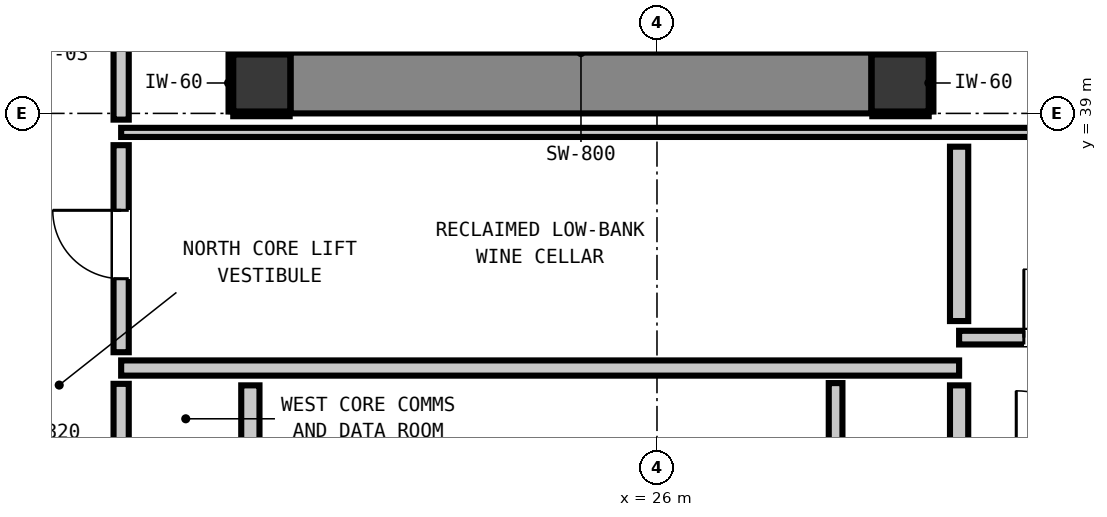
"""IFC4 building model, lengths in metres.
Left out: names, types, materials, properties, quantities, classifications, styles, units other than length and angle.
Written with IfcOpenShell. Run it as: python <this file> out.ifc"""

import sys

from ifc_helpers import new_model, si_unit, direction, frame, frame_2d, origin, origin_2d, place, context, subcontext, project, spatial, rectangle, extrude, element, fill, save


model = new_model("IFC4")
c1 = context("Model", 3, precision=1e-05, world=origin(), true_north=direction((0.0, 1.0)))
c2 = subcontext(c1, "Body", "Model", "MODEL_VIEW")
j1 = project(units=[si_unit("LENGTHUNIT", "METRE"), si_unit("PLANEANGLEUNIT", "RADIAN")], contexts=[c1])
p1 = place(None, origin())
s1 = spatial("IfcSite", under=j1, at=p1, CompositionType="ELEMENT")
p2 = place(p1, origin())
s2 = spatial("IfcBuilding", under=s1, at=p2, CompositionType="ELEMENT")
p3 = place(p2, frame((0.0, 0.0, 247.88)))
s3 = spatial("IfcBuildingStorey", under=s2, at=p3, CompositionType="ELEMENT", Elevation=247.88)
for number, where, z_axis, x_axis in (
    (1, (20.8, 39.4, 0.0), (0.0, 0.0, 1.0), (1.0, 0.0, 0.0)),
    (2, (29.2, 39.4, 0.0), (0.0, 0.0, 1.0), (1.0, 0.0, 0.0)),
):
    element("IfcColumn", number, at=place(p3, frame(where, z_axis=z_axis, x_axis=x_axis)), inside=s3, PredefinedType="COLUMN", context=c2, shape_type="SweptSolid", body=[
        extrude(rectangle(XDim=0.75, YDim=0.75, at=origin_2d()), origin(), (0.0, 0.0, 1.0), 3.32),
    ])
p4 = place(p3, frame((21.18, 39.4, 0.0), z_axis=(0.0, 0.0, 1.0), x_axis=(1.0, 0.0, 0.0)))
e3 = element("IfcWall", 3, at=p4, inside=s3, PredefinedType="SHEAR", context=c2, shape_type="SweptSolid", body=[
    extrude(rectangle(XDim=7.64, YDim=0.8, at=frame_2d((3.82, 0.0))), origin(), (0.0, 0.0, 1.0), 3.32),
])
p5 = place(p3, frame((18.95, 35.65, 0.0), z_axis=(0.0, 0.0, 1.0), x_axis=(1.0, 0.0, 0.0)))
e4 = element("IfcWall", 4, at=p5, inside=s3, PredefinedType="PARTITIONING", context=c2, shape_type="SweptSolid", body=[
    extrude(rectangle(XDim=11.025, YDim=0.2, at=frame_2d((5.513, 0.0))), origin(), (0.0, 0.0, 1.0), 2.9),
])
p6 = place(p3, frame((29.975, 36.05, 0.0), z_axis=(0.0, 0.0, 1.0), x_axis=(1.0, 0.0, 0.0)))
e5 = element("IfcWall", 5, at=p6, inside=s3, PredefinedType="PARTITIONING", context=c2, shape_type="SweptSolid", body=[
    extrude(rectangle(XDim=2.505, YDim=0.18, at=frame_2d((1.252, 0.0))), origin(), (0.0, 0.0, 1.0), 2.9),
])
p7 = place(p6, frame((0.852, 0.0, 0.0)))
e6 = element("IfcOpeningElement", 6, at=p7, cuts=e5, PredefinedType="OPENING", context=c2, shape_type="SweptSolid", body=[
    extrude(rectangle(XDim=0.9, YDim=2.1, at=frame_2d((0.45, 1.05))), frame((0.0, 0.1, 0.0), z_axis=(0.0, -1.0, 0.0), x_axis=(1.0, 0.0, 0.0)), (0.0, 0.0, 1.0), 0.2),
])
p8 = place(p3, frame((18.95, 38.75, 0.0), z_axis=(0.0, 0.0, 1.0), x_axis=(1.0, 0.0, 0.0)))
e7 = element("IfcWall", 7, at=p8, inside=s3, PredefinedType="PARTITIONING", context=c2, shape_type="SweptSolid", body=[
    extrude(rectangle(XDim=13.56, YDim=0.12, at=frame_2d((6.78, 0.0))), origin(), (0.0, 0.0, 1.0), 0.905),
])
p9 = place(p3, frame((20.65, 33.148, 0.0), z_axis=(0.0, 0.0, 1.0), x_axis=(0.0, 1.0, 0.0)))
e8 = element("IfcWall", 8, at=p9, inside=s3, PredefinedType="PARTITIONING", context=c2, shape_type="SweptSolid", body=[
    extrude(rectangle(XDim=2.274, YDim=0.24, at=frame_2d((1.137, 0.0))), origin(), (0.0, 0.0, 1.0), 0.905),
])
p10 = place(p3, frame((29.975, 34.498, 0.0), z_axis=(0.0, 0.0, 1.0), x_axis=(0.0, 1.0, 0.0)))
e9 = element("IfcWall", 9, at=p10, inside=s3, PredefinedType="PARTITIONING", context=c2, shape_type="SweptSolid", body=[
    extrude(rectangle(XDim=0.924, YDim=0.24, at=frame_2d((0.462, 0.0))), origin(), (0.0, 0.0, 1.0), 2.9),
])
p11 = place(p3, frame((29.975, 36.268, 0.0), z_axis=(0.0, 0.0, 1.0), x_axis=(0.0, 1.0, 0.0)))
e10 = element("IfcWall", 10, at=p11, inside=s3, PredefinedType="PARTITIONING", context=c2, shape_type="SweptSolid", body=[
    extrude(rectangle(XDim=2.294, YDim=0.24, at=frame_2d((1.147, 0.0))), origin(), (0.0, 0.0, 1.0), 2.9),
])
p12 = place(p3, frame((18.95, 33.128, 0.0), z_axis=(0.0, 0.0, 1.0), x_axis=(0.0, 1.0, 0.0)))
e11 = element("IfcWall", 11, at=p12, inside=s3, PredefinedType="PARTITIONING", context=c2, shape_type="SweptSolid", body=[
    extrude(rectangle(XDim=2.314, YDim=0.2, at=frame_2d((1.157, 0.0))), origin(), (0.0, 0.0, 1.0), 2.9),
])
p13 = place(p3, frame((18.95, 35.858, 0.0), z_axis=(0.0, 0.0, 1.0), x_axis=(0.0, 1.0, 0.0)))
e12 = element("IfcWall", 12, at=p13, inside=s3, PredefinedType="PARTITIONING", context=c2, shape_type="SweptSolid", body=[
    extrude(rectangle(XDim=2.724, YDim=0.2, at=frame_2d((1.362, 0.0))), origin(), (0.0, 0.0, 1.0), 2.9),
])
p14 = place(p13, frame((0.967, 0.0, 0.0)))
e13 = element("IfcOpeningElement", 13, at=p14, cuts=e12, PredefinedType="OPENING", context=c2, shape_type="SweptSolid", body=[
    extrude(rectangle(XDim=0.9, YDim=2.1, at=frame_2d((0.45, 1.05))), frame((0.0, 0.11, 0.0), z_axis=(0.0, -1.0, 0.0), x_axis=(1.0, 0.0, 0.0)), (0.0, 0.0, 1.0), 0.22),
])
p15 = place(p3, frame((18.95, 38.918, 0.0), z_axis=(0.0, 0.0, 1.0), x_axis=(0.0, 1.0, 0.0)))
e14 = element("IfcWall", 14, at=p15, inside=s3, PredefinedType="PARTITIONING", context=c2, shape_type="SweptSolid", body=[
    extrude(rectangle(XDim=1.134, YDim=0.2, at=frame_2d((0.567, 0.0))), origin(), (0.0, 0.0, 1.0), 2.9),
])
p16 = place(p3, frame((28.35, 31.838, 0.0), z_axis=(0.0, 0.0, 1.0), x_axis=(0.0, 1.0, 0.0)))
e15 = element("IfcWall", 15, at=p16, inside=s3, PredefinedType="PARTITIONING", context=c2, shape_type="SweptSolid", body=[
    extrude(rectangle(XDim=3.614, YDim=0.18, at=frame_2d((1.807, 0.0))), origin(), (0.0, 0.0, 1.0), 2.9),
])
for number, where, z_axis, x_axis in (
    (16, (20.425, 38.993, 0.0), (0.0, 0.0, 1.0), (1.0, 0.0, 0.0)),
    (17, (20.425, 39.807, 0.0), (0.0, 0.0, 1.0), (1.0, 0.0, 0.0)),
):
    element("IfcWall", number, at=place(p3, frame(where, z_axis=z_axis, x_axis=x_axis)), inside=s3, PredefinedType="PARTITIONING", context=c2, shape_type="SweptSolid", body=[
        extrude(rectangle(XDim=0.742, YDim=0.06, at=frame_2d((0.371, 0.0))), origin(), (0.0, 0.0, 1.0), 0.905),
    ])
p17 = place(p3, frame((20.393, 39.025, 0.0), z_axis=(0.0, 0.0, 1.0), x_axis=(0.0, 1.0, 0.0)))
e18 = element("IfcWall", 18, at=p17, inside=s3, PredefinedType="PARTITIONING", context=c2, shape_type="SweptSolid", body=[
    extrude(rectangle(XDim=0.75, YDim=0.06, at=frame_2d((0.375, 0.0))), origin(), (0.0, 0.0, 1.0), 0.905),
])
for number, where, z_axis, x_axis in (
    (19, (28.833, 38.993, 0.0), (0.0, 0.0, 1.0), (1.0, 0.0, 0.0)),
    (20, (28.833, 39.807, 0.0), (0.0, 0.0, 1.0), (1.0, 0.0, 0.0)),
):
    element("IfcWall", number, at=place(p3, frame(where, z_axis=z_axis, x_axis=x_axis)), inside=s3, PredefinedType="PARTITIONING", context=c2, shape_type="SweptSolid", body=[
        extrude(rectangle(XDim=0.742, YDim=0.06, at=frame_2d((0.371, 0.0))), origin(), (0.0, 0.0, 1.0), 0.905),
    ])
p18 = place(p3, frame((29.607, 39.025, 0.0), z_axis=(0.0, 0.0, 1.0), x_axis=(0.0, 1.0, 0.0)))
e21 = element("IfcWall", 21, at=p18, inside=s3, PredefinedType="PARTITIONING", context=c2, shape_type="SweptSolid", body=[
    extrude(rectangle(XDim=0.75, YDim=0.06, at=frame_2d((0.375, 0.0))), origin(), (0.0, 0.0, 1.0), 0.905),
])
p19 = place(p7, origin())
e22 = element("IfcDoor", 22, at=p19, inside=s3, OperationType="SINGLE_SWING_LEFT", PredefinedType="DOOR", context=c2, shape_type="SweptSolid", body=[
    extrude(rectangle(XDim=0.9, YDim=2.1, at=frame_2d((0.45, 1.05))), frame((0.0, 0.025, 0.0), z_axis=(0.0, -1.0, 0.0), x_axis=(1.0, 0.0, 0.0)), (0.0, 0.0, 1.0), 0.05),
])
fill(e6, e22)
p20 = place(p14, origin())
e23 = element("IfcDoor", 23, at=p20, inside=s3, OperationType="SINGLE_SWING_RIGHT", PredefinedType="DOOR", context=c2, shape_type="SweptSolid", body=[
    extrude(rectangle(XDim=0.9, YDim=2.1, at=frame_2d((0.45, 1.05))), frame((0.0, 0.025, 0.0), z_axis=(0.0, -1.0, 0.0), x_axis=(1.0, 0.0, 0.0)), (0.0, 0.0, 1.0), 0.05),
])
fill(e13, e23)
save(model, sys.argv[1])
